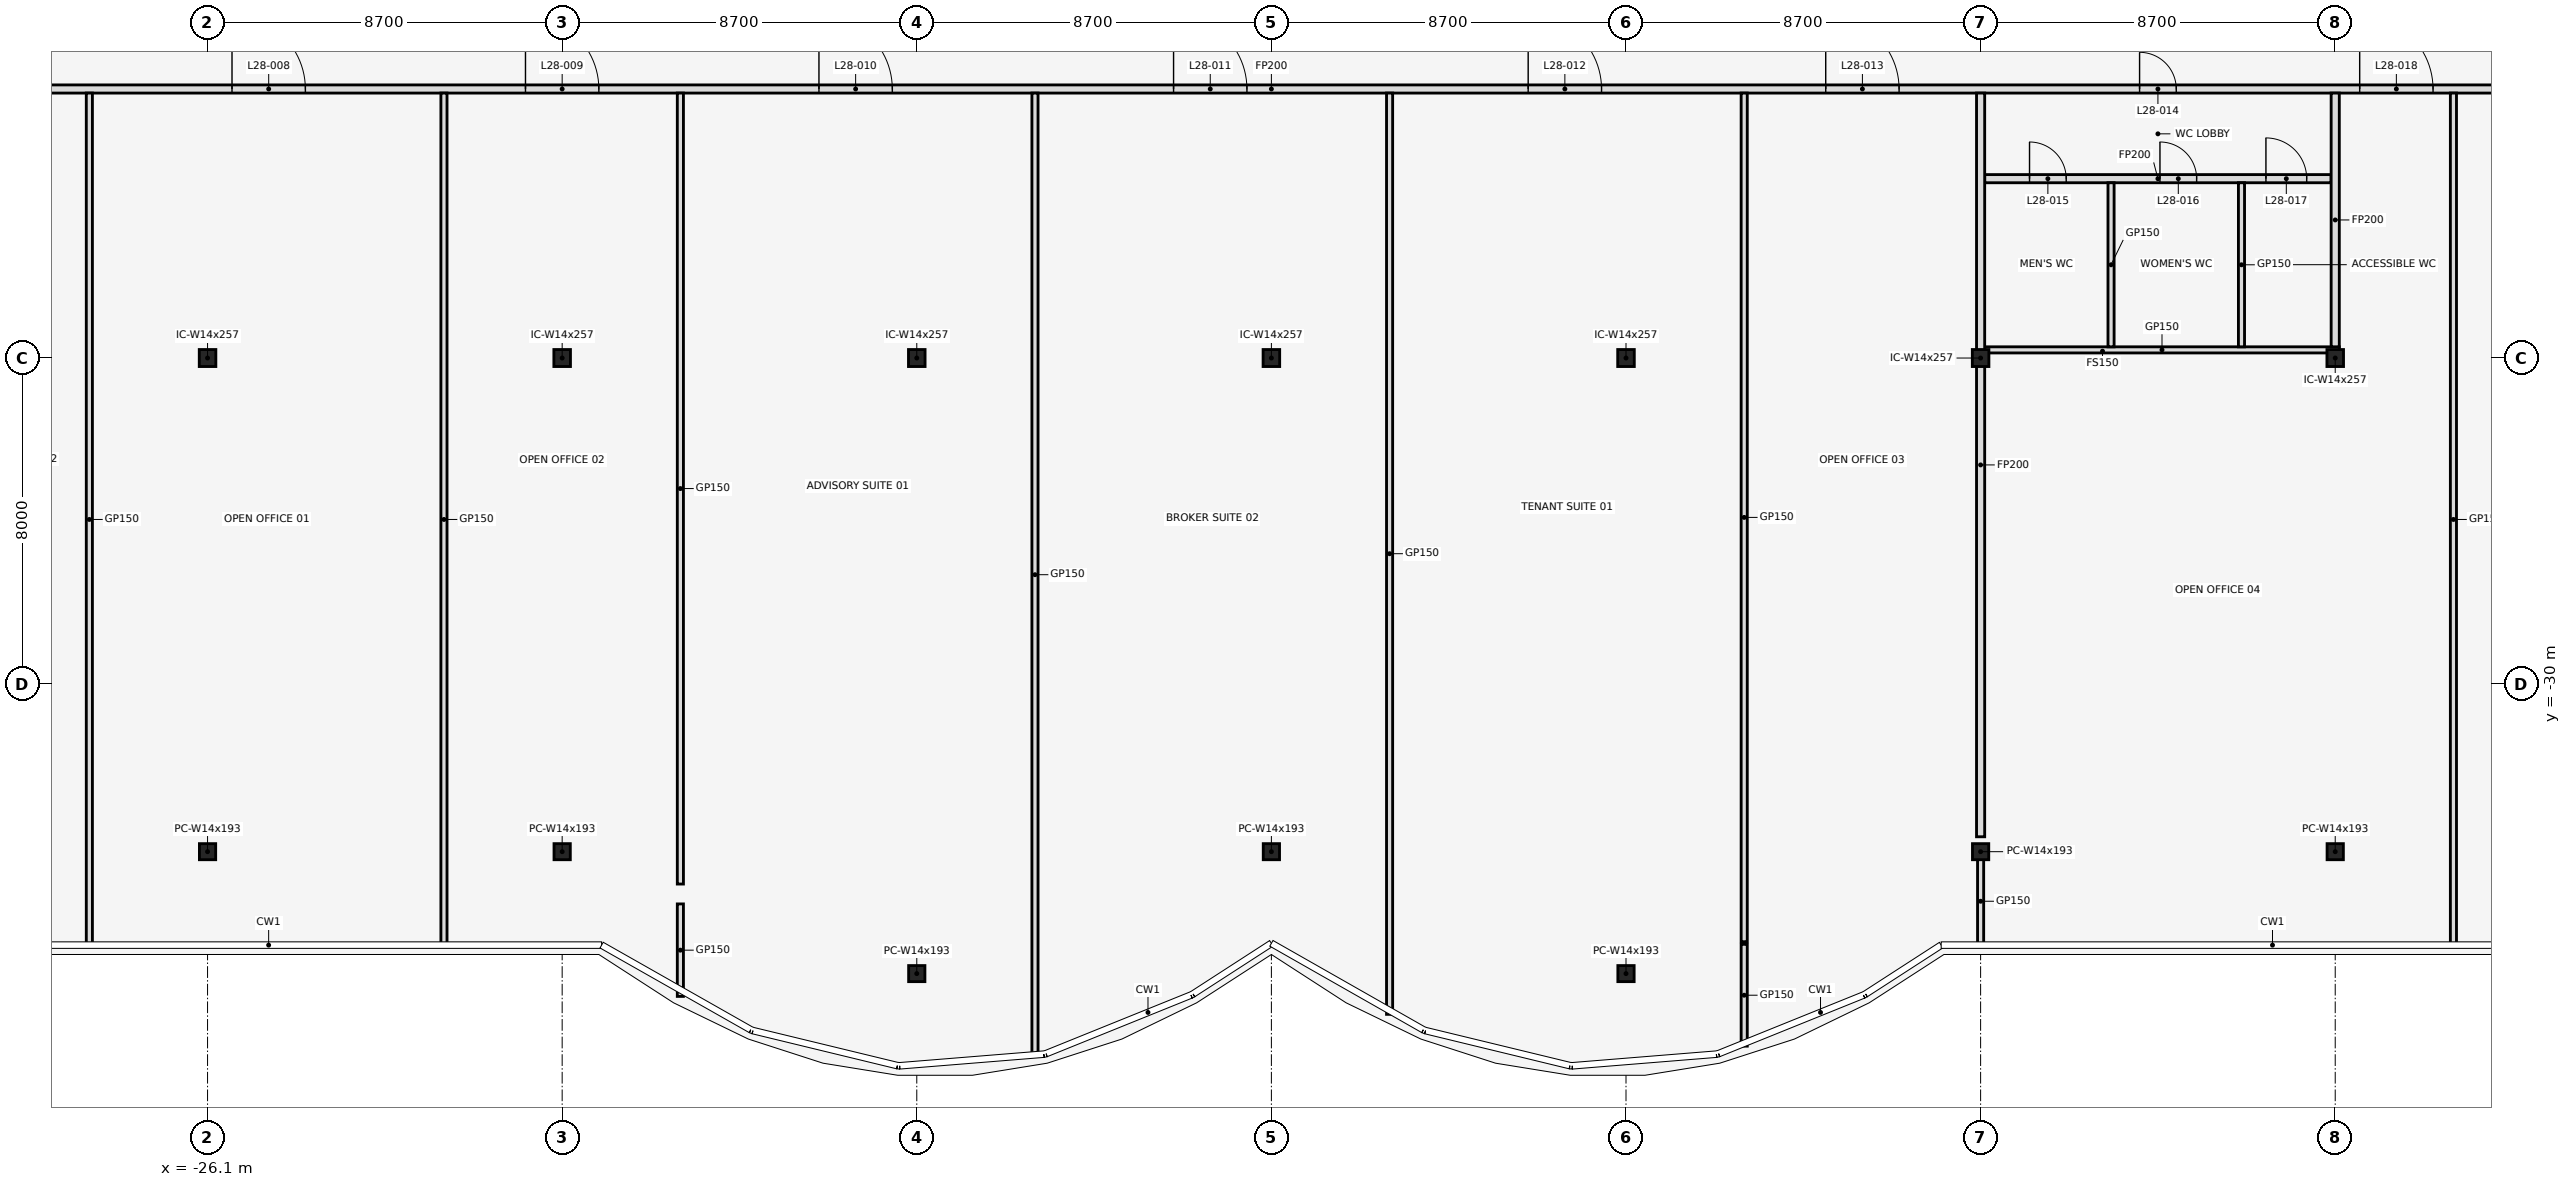
"""IFC4 building model, lengths in metres.
Left out: names, types, materials, properties, quantities, classifications, styles, units other than length and angle.
Written with IfcOpenShell. Run it as: python <this file> out.ifc"""

import sys

from ifc_helpers import new_model, si_unit, direction, frame, frame_2d, origin, origin_2d, place, context, subcontext, project, spatial, rectangle, i_section, extrude, element, fill, save


model = new_model("IFC4")
c1 = context("Model", 3, precision=1e-05, world=origin(), true_north=direction((0.0, 1.0)))
c2 = subcontext(c1, "Body", "Model", "MODEL_VIEW")
j1 = project(units=[si_unit("LENGTHUNIT", "METRE"), si_unit("PLANEANGLEUNIT", "RADIAN")], contexts=[c1])
p1 = place(None, origin())
s1 = spatial("IfcSite", under=j1, at=p1, CompositionType="ELEMENT")
p2 = place(p1, origin())
s2 = spatial("IfcBuilding", under=s1, at=p2, CompositionType="ELEMENT")
p3 = place(p2, frame((0.0, 0.0, 130.9)))
s3 = spatial("IfcBuildingStorey", under=s2, at=p3, CompositionType="ELEMENT", Elevation=130.9)
for number, where, z_axis, x_axis in (
    (1, (-26.1, -34.11, 0.0), (0.0, 0.0, 1.0), (1.0, 0.0, 0.0)),
    (2, (-17.4, -34.11, 0.0), (0.0, 0.0, 1.0), (1.0, 0.0, 0.0)),
    (3, (-8.7, -37.101, 0.0), (0.0, 0.0, 1.0), (1.0, 0.0, 0.0)),
    (4, (0.0, -34.11, 0.0), (0.0, 0.0, 1.0), (1.0, 0.0, 0.0)),
    (5, (8.7, -37.101, 0.0), (0.0, 0.0, 1.0), (1.0, 0.0, 0.0)),
    (6, (17.4, -34.11, 0.0), (0.0, 0.0, 1.0), (1.0, 0.0, 0.0)),
    (7, (26.1, -34.11, 0.0), (0.0, 0.0, 1.0), (1.0, 0.0, 0.0)),
):
    element("IfcColumn", number, at=place(p3, frame(where, z_axis=z_axis, x_axis=x_axis)), inside=s3, PredefinedType="COLUMN", context=c2, shape_type="SweptSolid", body=[
        extrude(i_section(OverallWidth=0.399, OverallDepth=0.394, WebThickness=0.023, FlangeThickness=0.037, at=origin_2d()), origin(), (0.0, 0.0, 1.0), 4.1),
    ])
for number, where, z_axis, x_axis in (
    (8, (-26.1, -22.0, 0.0), (0.0, 0.0, 1.0), (1.0, 0.0, 0.0)),
    (9, (-17.4, -22.0, 0.0), (0.0, 0.0, 1.0), (1.0, 0.0, 0.0)),
    (10, (-8.7, -22.0, 0.0), (0.0, 0.0, 1.0), (1.0, 0.0, 0.0)),
    (11, (0.0, -22.0, 0.0), (0.0, 0.0, 1.0), (1.0, 0.0, 0.0)),
    (12, (8.7, -22.0, 0.0), (0.0, 0.0, 1.0), (1.0, 0.0, 0.0)),
    (13, (17.4, -22.0, 0.0), (0.0, 0.0, 1.0), (1.0, 0.0, 0.0)),
    (14, (26.1, -22.0, 0.0), (0.0, 0.0, 1.0), (1.0, 0.0, 0.0)),
):
    element("IfcColumn", number, at=place(p3, frame(where, z_axis=z_axis, x_axis=x_axis)), inside=s3, PredefinedType="COLUMN", context=c2, shape_type="SweptSolid", body=[
        extrude(i_section(OverallWidth=0.406, OverallDepth=0.417, WebThickness=0.03, FlangeThickness=0.048, at=origin_2d()), origin(), (0.0, 0.0, 1.0), 4.1),
    ])
p4 = place(p3, frame((17.5, -21.8, 0.0), z_axis=(0.0, 0.0, 1.0), x_axis=(1.0, 0.0, 0.0)))
e15 = element("IfcWall", 15, at=p4, inside=s3, PredefinedType="PARTITIONING", context=c2, shape_type="SweptSolid", body=[
    extrude(rectangle(XDim=8.7, YDim=0.15, at=frame_2d((4.35, 0.0))), origin(), (0.0, 0.0, 1.0), 2.968),
])
p5 = place(p3, frame((17.5, -17.6, 0.0), z_axis=(0.0, 0.0, 1.0), x_axis=(1.0, 0.0, 0.0)))
e16 = element("IfcWall", 16, at=p5, inside=s3, PredefinedType="PARTITIONING", context=c2, shape_type="SweptSolid", body=[
    extrude(rectangle(XDim=8.5, YDim=0.2, at=frame_2d((4.25, 0.0))), origin(), (0.0, 0.0, 1.0), 2.968),
])
p6 = place(p5, frame((1.1, 0.0, 0.0)))
e17 = element("IfcOpeningElement", 17, at=p6, cuts=e16, PredefinedType="OPENING", context=c2, shape_type="SweptSolid", body=[
    extrude(rectangle(XDim=0.9, YDim=2.1, at=frame_2d((0.45, 1.05))), frame((0.0, 0.112, 0.0), z_axis=(0.0, -1.0, 0.0), x_axis=(1.0, 0.0, 0.0)), (0.0, 0.0, 1.0), 0.224),
])
p7 = place(p5, frame((4.3, 0.0, 0.0)))
e18 = element("IfcOpeningElement", 18, at=p7, cuts=e16, PredefinedType="OPENING", context=c2, shape_type="SweptSolid", body=[
    extrude(rectangle(XDim=0.9, YDim=2.1, at=frame_2d((0.45, 1.05))), frame((0.0, 0.112, 0.0), z_axis=(0.0, -1.0, 0.0), x_axis=(1.0, 0.0, 0.0)), (0.0, 0.0, 1.0), 0.224),
])
p8 = place(p5, frame((6.9, 0.0, 0.0)))
e19 = element("IfcOpeningElement", 19, at=p8, cuts=e16, PredefinedType="OPENING", context=c2, shape_type="SweptSolid", body=[
    extrude(rectangle(XDim=1.0, YDim=2.1, at=frame_2d((0.5, 1.05))), frame((0.0, 0.112, 0.0), z_axis=(0.0, -1.0, 0.0), x_axis=(1.0, 0.0, 0.0)), (0.0, 0.0, 1.0), 0.224),
])
p9 = place(p3, frame((-33.37, -15.4, 0.0), z_axis=(0.0, 0.0, 1.0), x_axis=(1.0, 0.0, 0.0)))
e20 = element("IfcWall", 20, at=p9, inside=s3, PredefinedType="PARTITIONING", context=c2, shape_type="SweptSolid", body=[
    extrude(rectangle(XDim=66.74, YDim=0.2, at=frame_2d((33.37, 0.0))), origin(), (0.0, 0.0, 1.0), 2.968),
])
p10 = place(p9, frame((1.7, 0.0, 0.0)))
e21 = element("IfcOpeningElement", 21, at=p10, cuts=e20, PredefinedType="OPENING", context=c2, shape_type="SweptSolid", body=[
    extrude(rectangle(XDim=1.0, YDim=2.1, at=frame_2d((0.5, 1.05))), frame((0.0, 0.112, 0.0), z_axis=(0.0, -1.0, 0.0), x_axis=(1.0, 0.0, 0.0)), (0.0, 0.0, 1.0), 0.224),
])
p11 = place(p9, frame((7.87, 0.0, 0.0)))
e22 = element("IfcOpeningElement", 22, at=p11, cuts=e20, PredefinedType="OPENING", context=c2, shape_type="SweptSolid", body=[
    extrude(rectangle(XDim=1.8, YDim=2.1, at=frame_2d((0.9, 1.05))), frame((0.0, 0.112, 0.0), z_axis=(0.0, -1.0, 0.0), x_axis=(1.0, 0.0, 0.0)), (0.0, 0.0, 1.0), 0.224),
])
p12 = place(p9, frame((15.07, 0.0, 0.0)))
e23 = element("IfcOpeningElement", 23, at=p12, cuts=e20, PredefinedType="OPENING", context=c2, shape_type="SweptSolid", body=[
    extrude(rectangle(XDim=1.8, YDim=2.1, at=frame_2d((0.9, 1.05))), frame((0.0, 0.112, 0.0), z_axis=(0.0, -1.0, 0.0), x_axis=(1.0, 0.0, 0.0)), (0.0, 0.0, 1.0), 0.224),
])
p13 = place(p9, frame((22.27, 0.0, 0.0)))
e24 = element("IfcOpeningElement", 24, at=p13, cuts=e20, PredefinedType="OPENING", context=c2, shape_type="SweptSolid", body=[
    extrude(rectangle(XDim=1.8, YDim=2.1, at=frame_2d((0.9, 1.05))), frame((0.0, 0.112, 0.0), z_axis=(0.0, -1.0, 0.0), x_axis=(1.0, 0.0, 0.0)), (0.0, 0.0, 1.0), 0.224),
])
p14 = place(p9, frame((30.97, 0.0, 0.0)))
e25 = element("IfcOpeningElement", 25, at=p14, cuts=e20, PredefinedType="OPENING", context=c2, shape_type="SweptSolid", body=[
    extrude(rectangle(XDim=1.8, YDim=2.1, at=frame_2d((0.9, 1.05))), frame((0.0, 0.112, 0.0), z_axis=(0.0, -1.0, 0.0), x_axis=(1.0, 0.0, 0.0)), (0.0, 0.0, 1.0), 0.224),
])
p15 = place(p9, frame((39.67, 0.0, 0.0)))
e26 = element("IfcOpeningElement", 26, at=p15, cuts=e20, PredefinedType="OPENING", context=c2, shape_type="SweptSolid", body=[
    extrude(rectangle(XDim=1.8, YDim=2.1, at=frame_2d((0.9, 1.05))), frame((0.0, 0.112, 0.0), z_axis=(0.0, -1.0, 0.0), x_axis=(1.0, 0.0, 0.0)), (0.0, 0.0, 1.0), 0.224),
])
p16 = place(p9, frame((46.97, 0.0, 0.0)))
e27 = element("IfcOpeningElement", 27, at=p16, cuts=e20, PredefinedType="OPENING", context=c2, shape_type="SweptSolid", body=[
    extrude(rectangle(XDim=1.8, YDim=2.1, at=frame_2d((0.9, 1.05))), frame((0.0, 0.112, 0.0), z_axis=(0.0, -1.0, 0.0), x_axis=(1.0, 0.0, 0.0)), (0.0, 0.0, 1.0), 0.224),
])
p17 = place(p9, frame((54.67, 0.0, 0.0)))
e28 = element("IfcOpeningElement", 28, at=p17, cuts=e20, PredefinedType="OPENING", context=c2, shape_type="SweptSolid", body=[
    extrude(rectangle(XDim=0.9, YDim=2.1, at=frame_2d((0.45, 1.05))), frame((0.0, 0.112, 0.0), z_axis=(0.0, -1.0, 0.0), x_axis=(1.0, 0.0, 0.0)), (0.0, 0.0, 1.0), 0.224),
])
p18 = place(p9, frame((60.07, 0.0, 0.0)))
e29 = element("IfcOpeningElement", 29, at=p18, cuts=e20, PredefinedType="OPENING", context=c2, shape_type="SweptSolid", body=[
    extrude(rectangle(XDim=1.8, YDim=2.1, at=frame_2d((0.9, 1.05))), frame((0.0, 0.112, 0.0), z_axis=(0.0, -1.0, 0.0), x_axis=(1.0, 0.0, 0.0)), (0.0, 0.0, 1.0), 0.224),
])
p19 = place(p9, frame((63.97, 0.0, 0.0)))
e30 = element("IfcOpeningElement", 30, at=p19, cuts=e20, PredefinedType="OPENING", context=c2, shape_type="SweptSolid", body=[
    extrude(rectangle(XDim=1.0, YDim=2.1, at=frame_2d((0.5, 1.05))), frame((0.0, 0.112, 0.0), z_axis=(0.0, -1.0, 0.0), x_axis=(1.0, 0.0, 0.0)), (0.0, 0.0, 1.0), 0.224),
])
for number, where, z_axis, x_axis in (
    (31, (-29.0, -36.42, 0.0), (0.0, 0.0, 1.0), (0.0, 1.0, 0.0)),
    (32, (-20.3, -36.42, 0.0), (0.0, 0.0, 1.0), (0.0, 1.0, 0.0)),
):
    element("IfcWall", number, at=place(p3, frame(where, z_axis=z_axis, x_axis=x_axis)), inside=s3, PredefinedType="PARTITIONING", context=c2, shape_type="SweptSolid", body=[
        extrude(rectangle(XDim=20.92, YDim=0.15, at=frame_2d((10.46, 0.0))), origin(), (0.0, 0.0, 1.0), 2.968),
    ])
p20 = place(p3, frame((-14.5, -37.66, 0.0), z_axis=(0.0, 0.0, 1.0), x_axis=(0.0, 1.0, 0.0)))
e33 = element("IfcWall", 33, at=p20, inside=s3, PredefinedType="PARTITIONING", context=c2, shape_type="SweptSolid", body=[
    extrude(rectangle(XDim=2.268, YDim=0.15, at=frame_2d((1.134, 0.0))), origin(), (0.0, 0.0, 1.0), 2.968),
])
p21 = place(p3, frame((-14.5, -34.904, 0.0), z_axis=(0.0, 0.0, 1.0), x_axis=(0.0, 1.0, 0.0)))
e34 = element("IfcWall", 34, at=p21, inside=s3, PredefinedType="PARTITIONING", context=c2, shape_type="SweptSolid", body=[
    extrude(rectangle(XDim=19.404, YDim=0.15, at=frame_2d((9.702, 0.0))), origin(), (0.0, 0.0, 1.0), 2.968),
])
p22 = place(p3, frame((-5.8, -39.13, 0.0), z_axis=(0.0, 0.0, 1.0), x_axis=(0.0, 1.0, 0.0)))
e35 = element("IfcWall", 35, at=p22, inside=s3, PredefinedType="PARTITIONING", context=c2, shape_type="SweptSolid", body=[
    extrude(rectangle(XDim=23.63, YDim=0.15, at=frame_2d((11.815, 0.0))), origin(), (0.0, 0.0, 1.0), 2.968),
])
p23 = place(p3, frame((2.9, -38.1, 0.0), z_axis=(0.0, 0.0, 1.0), x_axis=(0.0, 1.0, 0.0)))
e36 = element("IfcWall", 36, at=p23, inside=s3, PredefinedType="PARTITIONING", context=c2, shape_type="SweptSolid", body=[
    extrude(rectangle(XDim=22.6, YDim=0.15, at=frame_2d((11.3, 0.0))), origin(), (0.0, 0.0, 1.0), 2.968),
])
p24 = place(p3, frame((11.6, -38.88, 0.0), z_axis=(0.0, 0.0, 1.0), x_axis=(0.0, 1.0, 0.0)))
e37 = element("IfcWall", 37, at=p24, inside=s3, PredefinedType="PARTITIONING", context=c2, shape_type="SweptSolid", body=[
    extrude(rectangle(XDim=2.498, YDim=0.15, at=frame_2d((1.249, 0.0))), origin(), (0.0, 0.0, 1.0), 2.968),
])
p25 = place(p3, frame((11.6, -36.319, 0.0), z_axis=(0.0, 0.0, 1.0), x_axis=(0.0, 1.0, 0.0)))
e38 = element("IfcWall", 38, at=p25, inside=s3, PredefinedType="PARTITIONING", context=c2, shape_type="SweptSolid", body=[
    extrude(rectangle(XDim=20.819, YDim=0.15, at=frame_2d((10.41, 0.0))), origin(), (0.0, 0.0, 1.0), 2.968),
])
p26 = place(p3, frame((17.4, -36.42, 0.0), z_axis=(0.0, 0.0, 1.0), x_axis=(0.0, 1.0, 0.0)))
e39 = element("IfcWall", 39, at=p26, inside=s3, PredefinedType="PARTITIONING", context=c2, shape_type="SweptSolid", body=[
    extrude(rectangle(XDim=2.188, YDim=0.15, at=frame_2d((1.094, 0.0))), origin(), (0.0, 0.0, 1.0), 2.968),
])
p27 = place(p3, frame((17.4, -33.744, 0.0), z_axis=(0.0, 0.0, 1.0), x_axis=(0.0, 1.0, 0.0)))
e40 = element("IfcWall", 40, at=p27, inside=s3, PredefinedType="PARTITIONING", context=c2, shape_type="SweptSolid", body=[
    extrude(rectangle(XDim=18.244, YDim=0.2, at=frame_2d((9.122, 0.0))), origin(), (0.0, 0.0, 1.0), 2.968),
])
for number, where, z_axis, x_axis in (
    (41, (20.6, -21.725, 0.0), (0.0, 0.0, 1.0), (0.0, 1.0, 0.0)),
    (42, (23.8, -21.725, 0.0), (0.0, 0.0, 1.0), (0.0, 1.0, 0.0)),
):
    element("IfcWall", number, at=place(p3, frame(where, z_axis=z_axis, x_axis=x_axis)), inside=s3, PredefinedType="PARTITIONING", context=c2, shape_type="SweptSolid", body=[
        extrude(rectangle(XDim=4.025, YDim=0.15, at=frame_2d((2.013, 0.0))), origin(), (0.0, 0.0, 1.0), 2.968),
    ])
p28 = place(p3, frame((26.1, -21.725, 0.0), z_axis=(0.0, 0.0, 1.0), x_axis=(0.0, 1.0, 0.0)))
e43 = element("IfcWall", 43, at=p28, inside=s3, PredefinedType="PARTITIONING", context=c2, shape_type="SweptSolid", body=[
    extrude(rectangle(XDim=6.225, YDim=0.2, at=frame_2d((3.113, 0.0))), origin(), (0.0, 0.0, 1.0), 2.968),
])
p29 = place(p3, frame((29.0, -36.42, 0.0), z_axis=(0.0, 0.0, 1.0), x_axis=(0.0, 1.0, 0.0)))
e44 = element("IfcWall", 44, at=p29, inside=s3, PredefinedType="PARTITIONING", context=c2, shape_type="SweptSolid", body=[
    extrude(rectangle(XDim=20.92, YDim=0.15, at=frame_2d((10.46, 0.0))), origin(), (0.0, 0.0, 1.0), 2.968),
])
p30 = place(p11, origin())
e45 = element("IfcDoor", 45, at=p30, inside=s3, OperationType="SINGLE_SWING_LEFT", PredefinedType="DOOR", context=c2, shape_type="SweptSolid", body=[
    extrude(rectangle(XDim=1.8, YDim=2.1, at=frame_2d((0.9, 1.05))), frame((0.0, 0.025, 0.0), z_axis=(0.0, -1.0, 0.0), x_axis=(1.0, 0.0, 0.0)), (0.0, 0.0, 1.0), 0.05),
])
fill(e22, e45)
p31 = place(p12, origin())
e46 = element("IfcDoor", 46, at=p31, inside=s3, OperationType="SINGLE_SWING_LEFT", PredefinedType="DOOR", context=c2, shape_type="SweptSolid", body=[
    extrude(rectangle(XDim=1.8, YDim=2.1, at=frame_2d((0.9, 1.05))), frame((0.0, 0.025, 0.0), z_axis=(0.0, -1.0, 0.0), x_axis=(1.0, 0.0, 0.0)), (0.0, 0.0, 1.0), 0.05),
])
fill(e23, e46)
p32 = place(p13, origin())
e47 = element("IfcDoor", 47, at=p32, inside=s3, OperationType="SINGLE_SWING_LEFT", PredefinedType="DOOR", context=c2, shape_type="SweptSolid", body=[
    extrude(rectangle(XDim=1.8, YDim=2.1, at=frame_2d((0.9, 1.05))), frame((0.0, 0.025, 0.0), z_axis=(0.0, -1.0, 0.0), x_axis=(1.0, 0.0, 0.0)), (0.0, 0.0, 1.0), 0.05),
])
fill(e24, e47)
p33 = place(p14, origin())
e48 = element("IfcDoor", 48, at=p33, inside=s3, OperationType="SINGLE_SWING_LEFT", PredefinedType="DOOR", context=c2, shape_type="SweptSolid", body=[
    extrude(rectangle(XDim=1.8, YDim=2.1, at=frame_2d((0.9, 1.05))), frame((0.0, 0.025, 0.0), z_axis=(0.0, -1.0, 0.0), x_axis=(1.0, 0.0, 0.0)), (0.0, 0.0, 1.0), 0.05),
])
fill(e25, e48)
p34 = place(p15, origin())
e49 = element("IfcDoor", 49, at=p34, inside=s3, OperationType="SINGLE_SWING_LEFT", PredefinedType="DOOR", context=c2, shape_type="SweptSolid", body=[
    extrude(rectangle(XDim=1.8, YDim=2.1, at=frame_2d((0.9, 1.05))), frame((0.0, 0.025, 0.0), z_axis=(0.0, -1.0, 0.0), x_axis=(1.0, 0.0, 0.0)), (0.0, 0.0, 1.0), 0.05),
])
fill(e26, e49)
p35 = place(p16, origin())
e50 = element("IfcDoor", 50, at=p35, inside=s3, OperationType="SINGLE_SWING_LEFT", PredefinedType="DOOR", context=c2, shape_type="SweptSolid", body=[
    extrude(rectangle(XDim=1.8, YDim=2.1, at=frame_2d((0.9, 1.05))), frame((0.0, 0.025, 0.0), z_axis=(0.0, -1.0, 0.0), x_axis=(1.0, 0.0, 0.0)), (0.0, 0.0, 1.0), 0.05),
])
fill(e27, e50)
p36 = place(p17, frame((0.9, 0.0, 0.0), z_axis=(0.0, 0.0, 1.0), x_axis=(-1.0, 0.0, 0.0)))
e51 = element("IfcDoor", 51, at=p36, inside=s3, OperationType="SINGLE_SWING_RIGHT", PredefinedType="DOOR", context=c2, shape_type="SweptSolid", body=[
    extrude(rectangle(XDim=0.9, YDim=2.1, at=frame_2d((0.45, 1.05))), frame((0.0, 0.025, 0.0), z_axis=(0.0, -1.0, 0.0), x_axis=(1.0, 0.0, 0.0)), (0.0, 0.0, 1.0), 0.05),
])
fill(e28, e51)
p37 = place(p6, frame((0.9, 0.0, 0.0), z_axis=(0.0, 0.0, 1.0), x_axis=(-1.0, 0.0, 0.0)))
e52 = element("IfcDoor", 52, at=p37, inside=s3, OperationType="SINGLE_SWING_RIGHT", PredefinedType="DOOR", context=c2, shape_type="SweptSolid", body=[
    extrude(rectangle(XDim=0.9, YDim=2.1, at=frame_2d((0.45, 1.05))), frame((0.0, 0.025, 0.0), z_axis=(0.0, -1.0, 0.0), x_axis=(1.0, 0.0, 0.0)), (0.0, 0.0, 1.0), 0.05),
])
fill(e17, e52)
p38 = place(p7, frame((0.9, 0.0, 0.0), z_axis=(0.0, 0.0, 1.0), x_axis=(-1.0, 0.0, 0.0)))
e53 = element("IfcDoor", 53, at=p38, inside=s3, OperationType="SINGLE_SWING_LEFT", PredefinedType="DOOR", context=c2, shape_type="SweptSolid", body=[
    extrude(rectangle(XDim=0.9, YDim=2.1, at=frame_2d((0.45, 1.05))), frame((0.0, 0.025, 0.0), z_axis=(0.0, -1.0, 0.0), x_axis=(1.0, 0.0, 0.0)), (0.0, 0.0, 1.0), 0.05),
])
fill(e18, e53)
p39 = place(p8, frame((1.0, 0.0, 0.0), z_axis=(0.0, 0.0, 1.0), x_axis=(-1.0, 0.0, 0.0)))
e54 = element("IfcDoor", 54, at=p39, inside=s3, OperationType="SINGLE_SWING_RIGHT", PredefinedType="DOOR", context=c2, shape_type="SweptSolid", body=[
    extrude(rectangle(XDim=1.0, YDim=2.1, at=frame_2d((0.5, 1.05))), frame((0.0, 0.025, 0.0), z_axis=(0.0, -1.0, 0.0), x_axis=(1.0, 0.0, 0.0)), (0.0, 0.0, 1.0), 0.05),
])
fill(e19, e54)
p40 = place(p18, origin())
e55 = element("IfcDoor", 55, at=p40, inside=s3, OperationType="SINGLE_SWING_LEFT", PredefinedType="DOOR", context=c2, shape_type="SweptSolid", body=[
    extrude(rectangle(XDim=1.8, YDim=2.1, at=frame_2d((0.9, 1.05))), frame((0.0, 0.025, 0.0), z_axis=(0.0, -1.0, 0.0), x_axis=(1.0, 0.0, 0.0)), (0.0, 0.0, 1.0), 0.05),
])
fill(e29, e55)
save(model, sys.argv[1])
